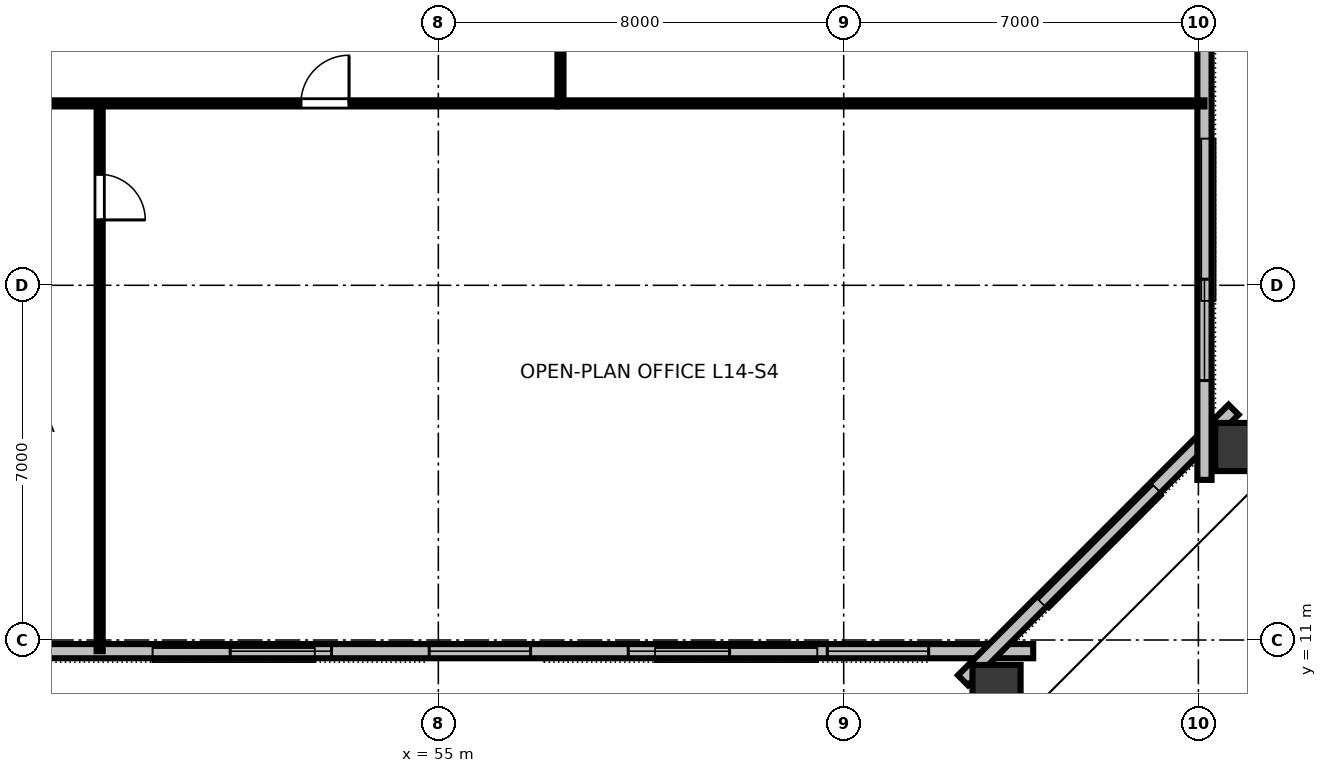
"""IFC4 building model, lengths in metres.
Left out: names, types, materials, properties, quantities, classifications, styles, units other than length and angle.
Written with IfcOpenShell. Run it as: python <this file> out.ifc"""

import sys

from ifc_helpers import new_model, si_unit, direction, frame, frame_2d, origin, origin_2d, place, context, subcontext, project, spatial, rectangle, hollow_rectangle, extrude, element, fill, save


model = new_model("IFC4")
c1 = context("Model", 3, precision=1e-05, world=origin(), true_north=direction((0.0, 1.0)))
c2 = subcontext(c1, "Body", "Model", "MODEL_VIEW")
j1 = project(units=[si_unit("LENGTHUNIT", "METRE"), si_unit("PLANEANGLEUNIT", "RADIAN")], contexts=[c1])
p1 = place(None, origin())
s1 = spatial("IfcSite", under=j1, at=p1, CompositionType="ELEMENT")
p2 = place(p1, origin())
s2 = spatial("IfcBuilding", under=s1, at=p2, CompositionType="ELEMENT")
p3 = place(p2, frame((0.0, 0.0, 56.8)))
s3 = spatial("IfcBuildingStorey", under=s2, at=p3, CompositionType="ELEMENT", Elevation=56.8)
p4 = place(p3, frame((66.016, 9.933, 0.0), z_axis=(0.04485544424, -0.088480981137, 0.995067387215), x_axis=(0.891933822614, 0.452165960769, 0.0)))
e1 = element("IfcColumn", 1, at=p4, inside=s3, PredefinedType="COLUMN", context=c2, shape_type="SweptSolid", body=[
    extrude(hollow_rectangle(XDim=0.95, YDim=1.15, WallThickness=0.06, at=origin_2d()), origin(), (0.0, 0.0, 1.0), 3.375),
])
p5 = place(p3, frame((70.907, 14.809, 0.0), z_axis=(0.103150348316, -0.030287313206, 0.994204548522), x_axis=(-0.953933183148, 0.280096708997, 0.107504956625)))
e2 = element("IfcColumn", 2, at=p5, inside=s3, PredefinedType="COLUMN", context=c2, shape_type="SweptSolid", body=[
    extrude(hollow_rectangle(XDim=0.95, YDim=1.15, WallThickness=0.06, at=origin_2d()), origin(), (0.0, 0.0, 1.0), 3.377),
])
p6 = place(p3, frame((25.26, 10.78, 0.0), z_axis=(0.0, 0.0, 1.0), x_axis=(1.0, 0.0, 0.0)))
e3 = element("IfcWall", 3, at=p6, inside=s3, PredefinedType="STANDARD", context=c2, shape_type="SweptSolid", body=[
    extrude(rectangle(XDim=41.48, YDim=0.28, at=frame_2d((20.74, 0.0))), origin(), (0.0, 0.0, 1.0), 3.36),
])
p7 = place(p6, frame((2.064, 0.0, 0.8)))
e4 = element("IfcOpeningElement", 4, at=p7, cuts=e3, PredefinedType="OPENING", context=c2, shape_type="SweptSolid", body=[
    extrude(rectangle(XDim=2.0, YDim=1.95, at=frame_2d((1.0, 0.975))), frame((0.0, 0.15, 0.0), z_axis=(0.0, -1.0, 0.0), x_axis=(1.0, 0.0, 0.0)), (0.0, 0.0, 1.0), 0.3),
])
p8 = place(p6, frame((5.992, 0.0, 0.8)))
e5 = element("IfcOpeningElement", 5, at=p8, cuts=e3, PredefinedType="OPENING", context=c2, shape_type="SweptSolid", body=[
    extrude(rectangle(XDim=2.0, YDim=1.95, at=frame_2d((1.0, 0.975))), frame((0.0, 0.15, 0.0), z_axis=(0.0, -1.0, 0.0), x_axis=(1.0, 0.0, 0.0)), (0.0, 0.0, 1.0), 0.3),
])
p9 = place(p6, frame((9.92, 0.0, 0.8)))
e6 = element("IfcOpeningElement", 6, at=p9, cuts=e3, PredefinedType="OPENING", context=c2, shape_type="SweptSolid", body=[
    extrude(rectangle(XDim=2.0, YDim=1.95, at=frame_2d((1.0, 0.975))), frame((0.0, 0.15, 0.0), z_axis=(0.0, -1.0, 0.0), x_axis=(1.0, 0.0, 0.0)), (0.0, 0.0, 1.0), 0.3),
])
p10 = place(p6, frame((25.632, 0.0, 0.8)))
e7 = element("IfcOpeningElement", 7, at=p10, cuts=e3, PredefinedType="OPENING", context=c2, shape_type="SweptSolid", body=[
    extrude(rectangle(XDim=2.0, YDim=1.95, at=frame_2d((1.0, 0.975))), frame((0.0, 0.15, 0.0), z_axis=(0.0, -1.0, 0.0), x_axis=(1.0, 0.0, 0.0)), (0.0, 0.0, 1.0), 0.3),
])
p11 = place(p6, frame((29.56, 0.0, 0.8)))
e8 = element("IfcOpeningElement", 8, at=p11, cuts=e3, PredefinedType="OPENING", context=c2, shape_type="SweptSolid", body=[
    extrude(rectangle(XDim=2.0, YDim=1.95, at=frame_2d((1.0, 0.975))), frame((0.0, 0.15, 0.0), z_axis=(0.0, -1.0, 0.0), x_axis=(1.0, 0.0, 0.0)), (0.0, 0.0, 1.0), 0.3),
])
p12 = place(p6, frame((33.488, 0.0, 0.8)))
e9 = element("IfcOpeningElement", 9, at=p12, cuts=e3, PredefinedType="OPENING", context=c2, shape_type="SweptSolid", body=[
    extrude(rectangle(XDim=2.0, YDim=1.95, at=frame_2d((1.0, 0.975))), frame((0.0, 0.15, 0.0), z_axis=(0.0, -1.0, 0.0), x_axis=(1.0, 0.0, 0.0)), (0.0, 0.0, 1.0), 0.3),
])
p13 = place(p6, frame((37.416, 0.0, 0.8)))
e10 = element("IfcOpeningElement", 10, at=p13, cuts=e3, PredefinedType="OPENING", context=c2, shape_type="SweptSolid", body=[
    extrude(rectangle(XDim=2.0, YDim=1.95, at=frame_2d((1.0, 0.975))), frame((0.0, 0.15, 0.0), z_axis=(0.0, -1.0, 0.0), x_axis=(1.0, 0.0, 0.0)), (0.0, 0.0, 1.0), 0.3),
])
p14 = place(p3, frame((65.354, 10.206, 0.0), z_axis=(0.0, 0.0, 1.0), x_axis=(0.707106781187, 0.707106781187, 0.0)))
e11 = element("IfcWall", 11, at=p14, inside=s3, PredefinedType="STANDARD", context=c2, shape_type="SweptSolid", body=[
    extrude(rectangle(XDim=7.551, YDim=0.28, at=frame_2d((3.775, 0.0))), origin(), (0.0, 0.0, 1.0), 3.36),
])
p15 = place(p3, frame((70.12, 14.16, 0.0), z_axis=(0.0, 0.0, 1.0), x_axis=(0.0, 1.0, 0.0)))
e12 = element("IfcWall", 12, at=p15, inside=s3, PredefinedType="STANDARD", context=c2, shape_type="SweptSolid", body=[
    extrude(rectangle(XDim=35.68, YDim=0.28, at=frame_2d((17.84, 0.0))), origin(), (0.0, 0.0, 1.0), 3.36),
])
p16 = place(p15, frame((1.96, 0.0, 0.8)))
e13 = element("IfcOpeningElement", 13, at=p16, cuts=e12, PredefinedType="OPENING", context=c2, shape_type="SweptSolid", body=[
    extrude(rectangle(XDim=2.0, YDim=1.95, at=frame_2d((1.0, 0.975))), frame((0.0, 0.15, 0.0), z_axis=(0.0, -1.0, 0.0), x_axis=(1.0, 0.0, 0.0)), (0.0, 0.0, 1.0), 0.3),
])
p17 = place(p15, frame((9.4, 0.0, 0.8)))
e14 = element("IfcOpeningElement", 14, at=p17, cuts=e12, PredefinedType="OPENING", context=c2, shape_type="SweptSolid", body=[
    extrude(rectangle(XDim=2.0, YDim=1.95, at=frame_2d((1.0, 0.975))), frame((0.0, 0.15, 0.0), z_axis=(0.0, -1.0, 0.0), x_axis=(1.0, 0.0, 0.0)), (0.0, 0.0, 1.0), 0.3),
])
p18 = place(p15, frame((13.12, 0.0, 0.8)))
e15 = element("IfcOpeningElement", 15, at=p18, cuts=e12, PredefinedType="OPENING", context=c2, shape_type="SweptSolid", body=[
    extrude(rectangle(XDim=2.0, YDim=1.95, at=frame_2d((1.0, 0.975))), frame((0.0, 0.15, 0.0), z_axis=(0.0, -1.0, 0.0), x_axis=(1.0, 0.0, 0.0)), (0.0, 0.0, 1.0), 0.3),
])
p19 = place(p15, frame((20.56, 0.0, 0.8)))
e16 = element("IfcOpeningElement", 16, at=p19, cuts=e12, PredefinedType="OPENING", context=c2, shape_type="SweptSolid", body=[
    extrude(rectangle(XDim=2.0, YDim=1.95, at=frame_2d((1.0, 0.975))), frame((0.0, 0.15, 0.0), z_axis=(0.0, -1.0, 0.0), x_axis=(1.0, 0.0, 0.0)), (0.0, 0.0, 1.0), 0.3),
])
p20 = place(p15, frame((24.28, 0.0, 0.8)))
e17 = element("IfcOpeningElement", 17, at=p20, cuts=e12, PredefinedType="OPENING", context=c2, shape_type="SweptSolid", body=[
    extrude(rectangle(XDim=2.0, YDim=1.95, at=frame_2d((1.0, 0.975))), frame((0.0, 0.15, 0.0), z_axis=(0.0, -1.0, 0.0), x_axis=(1.0, 0.0, 0.0)), (0.0, 0.0, 1.0), 0.3),
])
p21 = place(p15, frame((31.72, 0.0, 0.8)))
e18 = element("IfcOpeningElement", 18, at=p21, cuts=e12, PredefinedType="OPENING", context=c2, shape_type="SweptSolid", body=[
    extrude(rectangle(XDim=2.0, YDim=1.95, at=frame_2d((1.0, 0.975))), frame((0.0, 0.15, 0.0), z_axis=(0.0, -1.0, 0.0), x_axis=(1.0, 0.0, 0.0)), (0.0, 0.0, 1.0), 0.3),
])
p22 = place(p3, frame((48.316, 21.59, 0.0), z_axis=(0.0, 0.0, 1.0), x_axis=(0.0, -1.0, 0.0)))
e19 = element("IfcWall", 19, at=p22, inside=s3, PredefinedType="PARTITIONING", context=c2, shape_type="SweptSolid", body=[
    extrude(rectangle(XDim=10.81, YDim=0.12, at=frame_2d((5.405, 0.0))), origin(), (0.0, 0.0, 1.0), 2.64),
])
p23 = place(p22, frame((1.4, 0.0, 0.0)))
e20 = element("IfcOpeningElement", 20, at=p23, cuts=e19, PredefinedType="OPENING", context=c2, shape_type="SweptSolid", body=[
    extrude(rectangle(XDim=0.9, YDim=2.15, at=frame_2d((0.45, 1.075))), frame((0.0, 0.07, 0.0), z_axis=(0.0, -1.0, 0.0), x_axis=(1.0, 0.0, 0.0)), (0.0, 0.0, 1.0), 0.14),
])
p24 = place(p3, frame((34.65, 21.59, 0.0), z_axis=(0.0, 0.0, 1.0), x_axis=(1.0, 0.0, 0.0)))
e21 = element("IfcWall", 21, at=p24, inside=s3, PredefinedType="PARTITIONING", context=c2, shape_type="SweptSolid", body=[
    extrude(rectangle(XDim=22.7, YDim=0.12, at=frame_2d((11.35, 0.0))), origin(), (0.0, 0.0, 1.0), 2.64),
])
p25 = place(p24, frame((2.045, 0.0, 0.0)))
e22 = element("IfcOpeningElement", 22, at=p25, cuts=e21, PredefinedType="OPENING", context=c2, shape_type="SweptSolid", body=[
    extrude(rectangle(XDim=0.95, YDim=2.15, at=frame_2d((0.475, 1.075))), frame((0.0, 0.07, 0.0), z_axis=(0.0, -1.0, 0.0), x_axis=(1.0, 0.0, 0.0)), (0.0, 0.0, 1.0), 0.14),
])
p26 = place(p24, frame((7.126, 0.0, 0.0)))
e23 = element("IfcOpeningElement", 23, at=p26, cuts=e21, PredefinedType="OPENING", context=c2, shape_type="SweptSolid", body=[
    extrude(rectangle(XDim=0.95, YDim=2.15, at=frame_2d((0.475, 1.075))), frame((0.0, 0.07, 0.0), z_axis=(0.0, -1.0, 0.0), x_axis=(1.0, 0.0, 0.0)), (0.0, 0.0, 1.0), 0.14),
])
p27 = place(p24, frame((11.509, 0.0, 0.0)))
e24 = element("IfcOpeningElement", 24, at=p27, cuts=e21, PredefinedType="OPENING", context=c2, shape_type="SweptSolid", body=[
    extrude(rectangle(XDim=0.95, YDim=2.15, at=frame_2d((0.475, 1.075))), frame((0.0, 0.07, 0.0), z_axis=(0.0, -1.0, 0.0), x_axis=(1.0, 0.0, 0.0)), (0.0, 0.0, 1.0), 0.14),
])
p28 = place(p24, frame((17.638, 0.0, 0.0)))
e25 = element("IfcOpeningElement", 25, at=p28, cuts=e21, PredefinedType="OPENING", context=c2, shape_type="SweptSolid", body=[
    extrude(rectangle(XDim=0.95, YDim=2.15, at=frame_2d((0.475, 1.075))), frame((0.0, 0.07, 0.0), z_axis=(0.0, -1.0, 0.0), x_axis=(1.0, 0.0, 0.0)), (0.0, 0.0, 1.0), 0.14),
])
p29 = place(p3, frame((57.41, 21.65, 0.0), z_axis=(0.0, 0.0, 1.0), x_axis=(0.0, 1.0, 0.0)))
e26 = element("IfcWall", 26, at=p29, inside=s3, PredefinedType="PARTITIONING", context=c2, shape_type="SweptSolid", body=[
    extrude(rectangle(XDim=20.7, YDim=0.12, at=frame_2d((10.35, 0.0))), origin(), (0.0, 0.0, 1.0), 2.64),
])
p30 = place(p29, frame((5.479, 0.0, 0.0)))
e27 = element("IfcOpeningElement", 27, at=p30, cuts=e26, PredefinedType="OPENING", context=c2, shape_type="SweptSolid", body=[
    extrude(rectangle(XDim=0.95, YDim=2.15, at=frame_2d((0.475, 1.075))), frame((0.0, 0.07, 0.0), z_axis=(0.0, -1.0, 0.0), x_axis=(1.0, 0.0, 0.0)), (0.0, 0.0, 1.0), 0.14),
])
p31 = place(p29, frame((15.629, 0.0, 0.0)))
e28 = element("IfcOpeningElement", 28, at=p31, cuts=e26, PredefinedType="OPENING", context=c2, shape_type="SweptSolid", body=[
    extrude(rectangle(XDim=0.95, YDim=2.15, at=frame_2d((0.475, 1.075))), frame((0.0, 0.07, 0.0), z_axis=(0.0, -1.0, 0.0), x_axis=(1.0, 0.0, 0.0)), (0.0, 0.0, 1.0), 0.14),
])
p32 = place(p3, frame((57.35, 21.59, 0.0), z_axis=(0.0, 0.0, 1.0), x_axis=(1.0, 0.0, 0.0)))
e29 = element("IfcWall", 29, at=p32, inside=s3, PredefinedType="PARTITIONING", context=c2, shape_type="SweptSolid", body=[
    extrude(rectangle(XDim=12.77, YDim=0.12, at=frame_2d((6.385, 0.0))), origin(), (0.0, 0.0, 1.0), 2.64),
])
p33 = place(p10, origin())
e30 = element("IfcWindow", 30, at=p33, inside=s3, PartitioningType="SINGLE_PANEL", PredefinedType="WINDOW", context=c2, shape_type="SweptSolid", body=[
    extrude(rectangle(XDim=2.0, YDim=1.95, at=frame_2d((1.0, 0.975))), frame((0.0, 0.03, 0.0), z_axis=(0.0, -1.0, 0.0), x_axis=(1.0, 0.0, 0.0)), (0.0, 0.0, 1.0), 0.06),
])
fill(e7, e30)
p34 = place(p11, origin())
e31 = element("IfcWindow", 31, at=p34, inside=s3, PartitioningType="SINGLE_PANEL", PredefinedType="WINDOW", context=c2, shape_type="SweptSolid", body=[
    extrude(rectangle(XDim=2.0, YDim=1.95, at=frame_2d((1.0, 0.975))), frame((0.0, 0.03, 0.0), z_axis=(0.0, -1.0, 0.0), x_axis=(1.0, 0.0, 0.0)), (0.0, 0.0, 1.0), 0.06),
])
fill(e8, e31)
p35 = place(p12, origin())
e32 = element("IfcWindow", 32, at=p35, inside=s3, PartitioningType="SINGLE_PANEL", PredefinedType="WINDOW", context=c2, shape_type="SweptSolid", body=[
    extrude(rectangle(XDim=2.0, YDim=1.95, at=frame_2d((1.0, 0.975))), frame((0.0, 0.03, 0.0), z_axis=(0.0, -1.0, 0.0), x_axis=(1.0, 0.0, 0.0)), (0.0, 0.0, 1.0), 0.06),
])
fill(e9, e32)
p36 = place(p13, origin())
e33 = element("IfcWindow", 33, at=p36, inside=s3, PartitioningType="SINGLE_PANEL", PredefinedType="WINDOW", context=c2, shape_type="SweptSolid", body=[
    extrude(rectangle(XDim=2.0, YDim=1.95, at=frame_2d((1.0, 0.975))), frame((0.0, 0.03, 0.0), z_axis=(0.0, -1.0, 0.0), x_axis=(1.0, 0.0, 0.0)), (0.0, 0.0, 1.0), 0.06),
])
fill(e10, e33)
p37 = place(p16, origin())
e34 = element("IfcWindow", 34, at=p37, inside=s3, PartitioningType="SINGLE_PANEL", PredefinedType="WINDOW", context=c2, shape_type="SweptSolid", body=[
    extrude(rectangle(XDim=2.0, YDim=1.95, at=frame_2d((1.0, 0.975))), frame((0.0, 0.03, 0.0), z_axis=(0.0, -1.0, 0.0), x_axis=(1.0, 0.0, 0.0)), (0.0, 0.0, 1.0), 0.06),
])
fill(e13, e34)
p38 = place(p23, origin())
e35 = element("IfcDoor", 35, at=p38, inside=s3, OperationType="SINGLE_SWING_RIGHT", PredefinedType="DOOR", context=c2, shape_type="SweptSolid", body=[
    extrude(rectangle(XDim=0.9, YDim=2.15, at=frame_2d((0.45, 1.075))), frame((0.0, 0.025, 0.0), z_axis=(0.0, -1.0, 0.0), x_axis=(1.0, 0.0, 0.0)), (0.0, 0.0, 1.0), 0.05),
])
fill(e20, e35)
p39 = place(p28, origin())
e36 = element("IfcDoor", 36, at=p39, inside=s3, OperationType="SINGLE_SWING_RIGHT", PredefinedType="DOOR", context=c2, shape_type="SweptSolid", body=[
    extrude(rectangle(XDim=0.95, YDim=2.15, at=frame_2d((0.475, 1.075))), frame((0.0, 0.025, 0.0), z_axis=(0.0, -1.0, 0.0), x_axis=(1.0, 0.0, 0.0)), (0.0, 0.0, 1.0), 0.05),
])
fill(e25, e36)
save(model, sys.argv[1])
